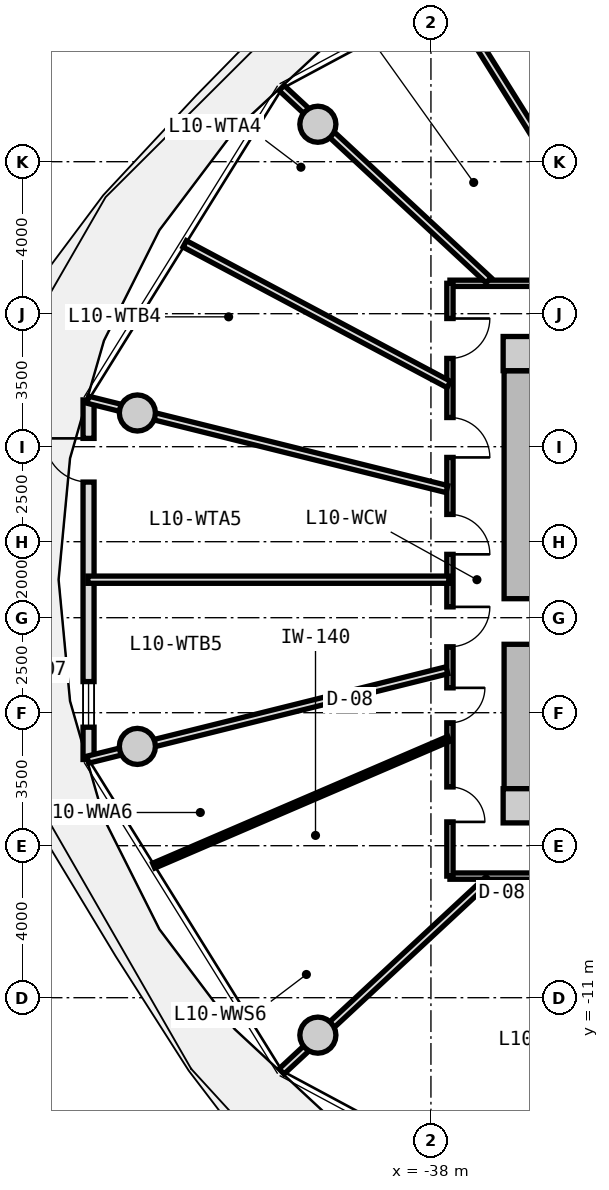
"""IFC4 building model, lengths in metres.
Left out: names, types, materials, properties, quantities, classifications, styles, units other than length and angle.
Written with IfcOpenShell. Run it as: python <this file> out.ifc"""

import sys

from ifc_helpers import new_model, si_unit, direction, frame, frame_2d, origin, origin_2d, place, context, subcontext, project, spatial, rectangle, circle, extrude, source, transform, mapped, element, fill, save


model = new_model("IFC4")
c1 = context("Model", 3, precision=1e-05, world=origin(), true_north=direction((0.0, 1.0)))
c2 = subcontext(c1, "Body", "Model", "MODEL_VIEW")
j1 = project(units=[si_unit("LENGTHUNIT", "METRE"), si_unit("PLANEANGLEUNIT", "RADIAN")], contexts=[c1])
p1 = place(None, origin())
s1 = spatial("IfcSite", under=j1, at=p1, CompositionType="ELEMENT")
p2 = place(p1, origin())
s2 = spatial("IfcBuilding", under=s1, at=p2, CompositionType="ELEMENT")
p3 = place(p2, frame((0.0, 0.0, 36.85)))
s3 = spatial("IfcBuildingStorey", under=s2, at=p3, CompositionType="ELEMENT", Elevation=36.85)
m1 = source(origin(), c2, "Body", "SweptSolid", [
    extrude(rectangle(XDim=0.9, YDim=0.9, at=origin_2d()), origin(), (0.0, 0.0, 1.0), 3.05),
])
for number, where, z_axis, x_axis in (
    (1, (-35.65, -5.95, 0.0), (0.0, 0.0, 1.0), (1.0, 0.0, 0.0)),
    (2, (-35.65, 5.95, 0.0), (0.0, 0.0, 1.0), (1.0, 0.0, 0.0)),
):
    element("IfcColumn", number, at=place(p3, frame(where, z_axis=z_axis, x_axis=x_axis)), inside=s3, PredefinedType="COLUMN", context=c2, shape_type="MappedRepresentation", body=[
        mapped(m1, transform((0.0, 0.0, 0.0), x_axis=(1.0, 0.0, 0.0), y_axis=(0.0, 1.0, 0.0), z_axis=(0.0, 0.0, 1.0), scale=1.0)),
    ])
m2 = source(origin(), c2, "Body", "SweptSolid", [
    extrude(rectangle(XDim=11.0, YDim=0.85, at=frame_2d((5.5, 0.0))), origin(), (0.0, 0.0, 1.0), 2.79),
])
p4 = place(p3, frame((-35.65, -5.5, 0.0), z_axis=(0.0, 0.0, 1.0), x_axis=(0.0, 1.0, 0.0)))
e3 = element("IfcWall", 3, at=p4, inside=s3, PredefinedType="SHEAR", context=c2, shape_type="MappedRepresentation", body=[
    mapped(m2, transform((0.0, 0.0, 0.0), x_axis=(1.0, 0.0, 0.0), y_axis=(0.0, 1.0, 0.0), z_axis=(0.0, 0.0, 1.0), scale=1.0)),
])
p5 = place(p4, frame((3.8, 0.0, 0.0)))
e4 = element("IfcOpeningElement", 4, at=p5, cuts=e3, PredefinedType="OPENING", context=c2, shape_type="SweptSolid", body=[
    extrude(rectangle(XDim=1.2, YDim=2.15, at=frame_2d((0.6, 1.075))), frame((0.0, 0.435, 0.0), z_axis=(0.0, -1.0, 0.0), x_axis=(1.0, 0.0, 0.0)), (0.0, 0.0, 1.0), 0.87),
])
m3 = source(origin(), c2, "Body", "SweptSolid", [
    extrude(circle(Radius=0.475, at=origin_2d()), origin(), (0.0, 0.0, 1.0), 3.05),
])
for number, where, z_axis, x_axis in (
    (5, (-40.975, 11.985, 0.0), (0.0, 0.0, 1.0), (1.0, 0.0, 0.0)),
    (6, (-45.725, 4.387, 0.0), (0.0, 0.0, 1.0), (1.0, 0.0, 0.0)),
    (7, (-45.725, -4.387, 0.0), (0.0, 0.0, 1.0), (1.0, 0.0, 0.0)),
    (8, (-40.975, -11.985, 0.0), (0.0, 0.0, 1.0), (1.0, 0.0, 0.0)),
):
    element("IfcColumn", number, at=place(p3, frame(where, z_axis=z_axis, x_axis=x_axis)), inside=s3, PredefinedType="COLUMN", context=c2, shape_type="MappedRepresentation", body=[
        mapped(m3, transform((0.0, 0.0, 0.0), x_axis=(1.0, 0.0, 0.0), y_axis=(0.0, 1.0, 0.0), z_axis=(0.0, 0.0, 1.0), scale=1.0)),
    ])
m4 = source(origin(), c2, "Body", "SweptSolid", [
    extrude(rectangle(XDim=9.462, YDim=0.29, at=frame_2d((4.731, 0.0))), origin(), (0.0, 0.0, 1.0), 2.79),
])
p6 = place(p3, frame((-47.01, -4.731, 0.0), z_axis=(0.0, 0.0, 1.0), x_axis=(0.0, 1.0, 0.0)))
e9 = element("IfcWall", 9, at=p6, inside=s3, PredefinedType="SOLIDWALL", context=c2, shape_type="MappedRepresentation", body=[
    mapped(m4, transform((0.0, 0.0, 0.0), x_axis=(1.0, 0.0, 0.0), y_axis=(0.0, 1.0, 0.0), z_axis=(0.0, 0.0, 1.0), scale=1.0)),
])
p7 = place(p6, frame((7.3, 0.0, 0.0)))
e10 = element("IfcOpeningElement", 10, at=p7, cuts=e9, PredefinedType="OPENING", context=c2, shape_type="SweptSolid", body=[
    extrude(rectangle(XDim=1.15, YDim=2.25, at=frame_2d((0.575, 1.125))), frame((0.0, 0.155, 0.0), z_axis=(0.0, -1.0, 0.0), x_axis=(1.0, 0.0, 0.0)), (0.0, 0.0, 1.0), 0.31),
])
p8 = place(p6, frame((0.85, 0.0, 0.85)))
e11 = element("IfcOpeningElement", 11, at=p8, cuts=e9, PredefinedType="OPENING", context=c2, shape_type="SweptSolid", body=[
    extrude(rectangle(XDim=1.2, YDim=1.5, at=frame_2d((0.6, 0.75))), frame((0.0, 0.155, 0.0), z_axis=(0.0, -1.0, 0.0), x_axis=(1.0, 0.0, 0.0)), (0.0, 0.0, 1.0), 0.31),
])
m5 = source(origin(), c2, "Body", "SweptSolid", [
    extrude(rectangle(XDim=19.0, YDim=0.165, at=frame_2d((9.5, 0.0))), origin(), (0.0, 0.0, 1.0), 2.775),
])
p9 = place(p3, frame((-37.5, 7.8, 0.0), z_axis=(0.0, 0.0, 1.0), x_axis=(1.0, 0.0, 0.0)))
e12 = element("IfcWall", 12, at=p9, inside=s3, PredefinedType="PARTITIONING", context=c2, shape_type="MappedRepresentation", body=[
    mapped(m5, transform((0.0, 0.0, 0.0), x_axis=(1.0, 0.0, 0.0), y_axis=(0.0, 1.0, 0.0), z_axis=(0.0, 0.0, 1.0), scale=1.0)),
])
p10 = place(p9, frame((9.352, 0.0, 0.0)))
e13 = element("IfcOpeningElement", 13, at=p10, cuts=e12, PredefinedType="OPENING", context=c2, shape_type="SweptSolid", body=[
    extrude(rectangle(XDim=1.05, YDim=2.15, at=frame_2d((0.525, 1.075))), frame((0.0, 0.093, 0.0), z_axis=(0.0, -1.0, 0.0), x_axis=(1.0, 0.0, 0.0)), (0.0, 0.0, 1.0), 0.185),
])
p11 = place(p9, frame((7.806, 0.0, 0.0)))
e14 = element("IfcOpeningElement", 14, at=p11, cuts=e12, PredefinedType="OPENING", context=c2, shape_type="SweptSolid", body=[
    extrude(rectangle(XDim=1.05, YDim=2.15, at=frame_2d((0.525, 1.075))), frame((0.0, 0.093, 0.0), z_axis=(0.0, -1.0, 0.0), x_axis=(1.0, 0.0, 0.0)), (0.0, 0.0, 1.0), 0.185),
])
p12 = place(p9, frame((4.773, 0.0, 0.0)))
e15 = element("IfcOpeningElement", 15, at=p12, cuts=e12, PredefinedType="OPENING", context=c2, shape_type="SweptSolid", body=[
    extrude(rectangle(XDim=1.05, YDim=2.15, at=frame_2d((0.525, 1.075))), frame((0.0, 0.093, 0.0), z_axis=(0.0, -1.0, 0.0), x_axis=(1.0, 0.0, 0.0)), (0.0, 0.0, 1.0), 0.185),
])
p13 = place(p9, frame((2.251, 0.0, 0.0)))
e16 = element("IfcOpeningElement", 16, at=p13, cuts=e12, PredefinedType="OPENING", context=c2, shape_type="SweptSolid", body=[
    extrude(rectangle(XDim=1.05, YDim=2.15, at=frame_2d((0.525, 1.075))), frame((0.0, 0.093, 0.0), z_axis=(0.0, -1.0, 0.0), x_axis=(1.0, 0.0, 0.0)), (0.0, 0.0, 1.0), 0.185),
])
p14 = place(p9, frame((14.653, 0.0, 0.0)))
e17 = element("IfcOpeningElement", 17, at=p14, cuts=e12, PredefinedType="OPENING", context=c2, shape_type="SweptSolid", body=[
    extrude(rectangle(XDim=1.05, YDim=2.15, at=frame_2d((0.525, 1.075))), frame((0.0, 0.093, 0.0), z_axis=(0.0, -1.0, 0.0), x_axis=(1.0, 0.0, 0.0)), (0.0, 0.0, 1.0), 0.185),
])
p15 = place(p9, frame((12.5, 0.0, 0.0)))
e18 = element("IfcOpeningElement", 18, at=p15, cuts=e12, PredefinedType="OPENING", context=c2, shape_type="SweptSolid", body=[
    extrude(rectangle(XDim=1.05, YDim=2.15, at=frame_2d((0.525, 1.075))), frame((0.0, 0.093, 0.0), z_axis=(0.0, -1.0, 0.0), x_axis=(1.0, 0.0, 0.0)), (0.0, 0.0, 1.0), 0.185),
])
p16 = place(p3, frame((-18.5, -7.8, 0.0), z_axis=(0.0, 0.0, 1.0), x_axis=(-1.0, 0.0, 0.0)))
e19 = element("IfcWall", 19, at=p16, inside=s3, PredefinedType="PARTITIONING", context=c2, shape_type="MappedRepresentation", body=[
    mapped(m5, transform((0.0, 0.0, 0.0), x_axis=(1.0, 0.0, 0.0), y_axis=(0.0, 1.0, 0.0), z_axis=(0.0, 0.0, 1.0), scale=1.0)),
])
p17 = place(p16, frame((14.244, 0.0, 0.0)))
e20 = element("IfcOpeningElement", 20, at=p17, cuts=e19, PredefinedType="OPENING", context=c2, shape_type="SweptSolid", body=[
    extrude(rectangle(XDim=1.25, YDim=2.2, at=frame_2d((0.625, 1.1))), frame((0.0, 0.093, 0.0), z_axis=(0.0, -1.0, 0.0), x_axis=(1.0, 0.0, 0.0)), (0.0, 0.0, 1.0), 0.185),
])
p18 = place(p16, frame((8.875, 0.0, 0.0)))
e21 = element("IfcOpeningElement", 21, at=p18, cuts=e19, PredefinedType="OPENING", context=c2, shape_type="SweptSolid", body=[
    extrude(rectangle(XDim=1.25, YDim=2.2, at=frame_2d((0.625, 1.1))), frame((0.0, 0.093, 0.0), z_axis=(0.0, -1.0, 0.0), x_axis=(1.0, 0.0, 0.0)), (0.0, 0.0, 1.0), 0.185),
])
p19 = place(p16, frame((3.506, 0.0, 0.0)))
e22 = element("IfcOpeningElement", 22, at=p19, cuts=e19, PredefinedType="OPENING", context=c2, shape_type="SweptSolid", body=[
    extrude(rectangle(XDim=1.25, YDim=2.2, at=frame_2d((0.625, 1.1))), frame((0.0, 0.093, 0.0), z_axis=(0.0, -1.0, 0.0), x_axis=(1.0, 0.0, 0.0)), (0.0, 0.0, 1.0), 0.185),
])
m6 = source(origin(), c2, "Body", "SweptSolid", [
    extrude(rectangle(XDim=15.6, YDim=0.165, at=frame_2d((7.8, 0.0))), origin(), (0.0, 0.0, 1.0), 2.775),
])
p20 = place(p3, frame((-37.5, -7.8, 0.0), z_axis=(0.0, 0.0, 1.0), x_axis=(0.0, 1.0, 0.0)))
e23 = element("IfcWall", 23, at=p20, inside=s3, PredefinedType="PARTITIONING", context=c2, shape_type="MappedRepresentation", body=[
    mapped(m6, transform((0.0, 0.0, 0.0), x_axis=(1.0, 0.0, 0.0), y_axis=(0.0, 1.0, 0.0), z_axis=(0.0, 0.0, 1.0), scale=1.0)),
])
p21 = place(p20, frame((13.623, 0.0, 0.0)))
e24 = element("IfcOpeningElement", 24, at=p21, cuts=e23, PredefinedType="OPENING", context=c2, shape_type="SweptSolid", body=[
    extrude(rectangle(XDim=1.05, YDim=2.15, at=frame_2d((0.525, 1.075))), frame((0.0, 0.093, 0.0), z_axis=(0.0, -1.0, 0.0), x_axis=(1.0, 0.0, 0.0)), (0.0, 0.0, 1.0), 0.185),
])
p22 = place(p20, frame((11.018, 0.0, 0.0)))
e25 = element("IfcOpeningElement", 25, at=p22, cuts=e23, PredefinedType="OPENING", context=c2, shape_type="SweptSolid", body=[
    extrude(rectangle(XDim=1.05, YDim=2.15, at=frame_2d((0.525, 1.075))), frame((0.0, 0.093, 0.0), z_axis=(0.0, -1.0, 0.0), x_axis=(1.0, 0.0, 0.0)), (0.0, 0.0, 1.0), 0.185),
])
p23 = place(p20, frame((8.467, 0.0, 0.0)))
e26 = element("IfcOpeningElement", 26, at=p23, cuts=e23, PredefinedType="OPENING", context=c2, shape_type="SweptSolid", body=[
    extrude(rectangle(XDim=1.05, YDim=2.15, at=frame_2d((0.525, 1.075))), frame((0.0, 0.093, 0.0), z_axis=(0.0, -1.0, 0.0), x_axis=(1.0, 0.0, 0.0)), (0.0, 0.0, 1.0), 0.185),
])
p24 = place(p20, frame((6.035, 0.0, 0.0)))
e27 = element("IfcOpeningElement", 27, at=p24, cuts=e23, PredefinedType="OPENING", context=c2, shape_type="SweptSolid", body=[
    extrude(rectangle(XDim=1.05, YDim=2.15, at=frame_2d((0.525, 1.075))), frame((0.0, 0.093, 0.0), z_axis=(0.0, -1.0, 0.0), x_axis=(1.0, 0.0, 0.0)), (0.0, 0.0, 1.0), 0.185),
])
p25 = place(p20, frame((4.034, 0.0, 0.0)))
e28 = element("IfcOpeningElement", 28, at=p25, cuts=e23, PredefinedType="OPENING", context=c2, shape_type="SweptSolid", body=[
    extrude(rectangle(XDim=0.92, YDim=2.1, at=frame_2d((0.46, 1.05))), frame((0.0, 0.093, 0.0), z_axis=(0.0, -1.0, 0.0), x_axis=(1.0, 0.0, 0.0)), (0.0, 0.0, 1.0), 0.185),
])
p26 = place(p20, frame((1.426, 0.0, 0.0)))
e29 = element("IfcOpeningElement", 29, at=p26, cuts=e23, PredefinedType="OPENING", context=c2, shape_type="SweptSolid", body=[
    extrude(rectangle(XDim=0.92, YDim=2.1, at=frame_2d((0.46, 1.05))), frame((0.0, 0.093, 0.0), z_axis=(0.0, -1.0, 0.0), x_axis=(1.0, 0.0, 0.0)), (0.0, 0.0, 1.0), 0.185),
])
m7 = source(origin(), c2, "Body", "SweptSolid", [
    extrude(rectangle(XDim=7.435, YDim=0.19, at=frame_2d((3.717, 0.0))), origin(), (0.0, 0.0, 1.0), 2.225),
])
p27 = place(p3, frame((-36.483, 7.88, 0.0), z_axis=(0.0, 0.0, 1.0), x_axis=(-0.732651956848, 0.680603489652, 0.0)))
e30 = element("IfcWall", 30, at=p27, inside=s3, PredefinedType="PARTITIONING", context=c2, shape_type="MappedRepresentation", body=[
    mapped(m7, transform((0.0, 0.0, 0.0), x_axis=(1.0, 0.0, 0.0), y_axis=(0.0, 1.0, 0.0), z_axis=(0.0, 0.0, 1.0), scale=1.0)),
])
m8 = source(origin(), c2, "Body", "SweptSolid", [
    extrude(rectangle(XDim=8.598, YDim=0.19, at=frame_2d((4.299, 0.0))), origin(), (0.0, 0.0, 1.0), 2.775),
])
p28 = place(p3, frame((-32.957, 8.017, 0.0), z_axis=(0.0, 0.0, 1.0), x_axis=(-0.530039776395, 0.847972779893, 0.0)))
e31 = element("IfcWall", 31, at=p28, inside=s3, PredefinedType="PARTITIONING", context=c2, shape_type="MappedRepresentation", body=[
    mapped(m8, transform((0.0, 0.0, 0.0), x_axis=(1.0, 0.0, 0.0), y_axis=(0.0, 1.0, 0.0), z_axis=(0.0, 0.0, 1.0), scale=1.0)),
])
m9 = source(origin(), c2, "Body", "SweptSolid", [
    extrude(rectangle(XDim=9.737, YDim=0.19, at=frame_2d((4.869, 0.0))), origin(), (0.0, 0.0, 1.0), 2.225),
])
p29 = place(p3, frame((-37.58, 2.385, 0.0), z_axis=(0.0, 0.0, 1.0), x_axis=(-0.970392716238, 0.241532557375, 0.0)))
e32 = element("IfcWall", 32, at=p29, inside=s3, PredefinedType="PARTITIONING", context=c2, shape_type="MappedRepresentation", body=[
    mapped(m9, transform((0.0, 0.0, 0.0), x_axis=(1.0, 0.0, 0.0), y_axis=(0.0, 1.0, 0.0), z_axis=(0.0, 0.0, 1.0), scale=1.0)),
])
m10 = source(origin(), c2, "Body", "SweptSolid", [
    extrude(rectangle(XDim=7.873, YDim=0.19, at=frame_2d((3.937, 0.0))), origin(), (0.0, 0.0, 1.0), 2.775),
])
p30 = place(p3, frame((-37.53, 5.138, 0.0), z_axis=(0.0, 0.0, 1.0), x_axis=(-0.882666052726, 0.470000680175, 0.0)))
e33 = element("IfcWall", 33, at=p30, inside=s3, PredefinedType="PARTITIONING", context=c2, shape_type="MappedRepresentation", body=[
    mapped(m10, transform((0.0, 0.0, 0.0), x_axis=(1.0, 0.0, 0.0), y_axis=(0.0, 1.0, 0.0), z_axis=(0.0, 0.0, 1.0), scale=1.0)),
])
p31 = place(p3, frame((-37.58, -2.385, 0.0), z_axis=(0.0, 0.0, 1.0), x_axis=(-0.970392716238, -0.241532557375, 0.0)))
e34 = element("IfcWall", 34, at=p31, inside=s3, PredefinedType="PARTITIONING", context=c2, shape_type="MappedRepresentation", body=[
    mapped(m9, transform((0.0, 0.0, 0.0), x_axis=(1.0, 0.0, 0.0), y_axis=(0.0, 1.0, 0.0), z_axis=(0.0, 0.0, 1.0), scale=1.0)),
])
m11 = source(origin(), c2, "Body", "SweptSolid", [
    extrude(rectangle(XDim=9.499, YDim=0.19, at=frame_2d((4.75, 0.0))), origin(), (0.0, 0.0, 1.0), 2.775),
])
p32 = place(p3, frame((-37.53, 0.0, 0.0), z_axis=(0.0, 0.0, 1.0), x_axis=(-1.0, 0.0, 0.0)))
e35 = element("IfcWall", 35, at=p32, inside=s3, PredefinedType="PARTITIONING", context=c2, shape_type="MappedRepresentation", body=[
    mapped(m11, transform((0.0, 0.0, 0.0), x_axis=(1.0, 0.0, 0.0), y_axis=(0.0, 1.0, 0.0), z_axis=(0.0, 0.0, 1.0), scale=1.0)),
])
p33 = place(p3, frame((-36.483, -7.88, 0.0), z_axis=(0.0, 0.0, 1.0), x_axis=(-0.732651956848, -0.680603489652, 0.0)))
e36 = element("IfcWall", 36, at=p33, inside=s3, PredefinedType="PARTITIONING", context=c2, shape_type="MappedRepresentation", body=[
    mapped(m7, transform((0.0, 0.0, 0.0), x_axis=(1.0, 0.0, 0.0), y_axis=(0.0, 1.0, 0.0), z_axis=(0.0, 0.0, 1.0), scale=1.0)),
])
m12 = source(origin(), c2, "Body", "SweptSolid", [
    extrude(rectangle(XDim=8.452, YDim=0.14, at=frame_2d((4.226, 0.0))), origin(), (0.0, 0.0, 1.0), 2.775),
])
p34 = place(p3, frame((-37.53, -4.188, 0.0), z_axis=(0.0, 0.0, 1.0), x_axis=(-0.918706709896, -0.394940478036, 0.0)))
e37 = element("IfcWall", 37, at=p34, inside=s3, PredefinedType="PARTITIONING", context=c2, shape_type="MappedRepresentation", body=[
    mapped(m12, transform((0.0, 0.0, 0.0), x_axis=(1.0, 0.0, 0.0), y_axis=(0.0, 1.0, 0.0), z_axis=(0.0, 0.0, 1.0), scale=1.0)),
])
m13 = source(origin(), c2, "Body", "SweptSolid", [
    extrude(rectangle(XDim=1.15, YDim=2.25, at=frame_2d((0.575, 1.125))), frame((0.0, 0.025, 0.0), z_axis=(0.0, -1.0, 0.0), x_axis=(1.0, 0.0, 0.0)), (0.0, 0.0, 1.0), 0.05),
])
p35 = place(p7, origin())
e38 = element("IfcDoor", 38, at=p35, inside=s3, OperationType="SINGLE_SWING_RIGHT", PredefinedType="DOOR", context=c2, shape_type="MappedRepresentation", body=[
    mapped(m13, transform((0.0, 0.0, 0.0), x_axis=(1.0, 0.0, 0.0), y_axis=(0.0, 1.0, 0.0), z_axis=(0.0, 0.0, 1.0), scale=1.0)),
])
fill(e10, e38)
m14 = source(origin(), c2, "Body", "SweptSolid", [
    extrude(rectangle(XDim=1.2, YDim=1.5, at=frame_2d((0.6, 0.75))), frame((0.0, 0.03, 0.0), z_axis=(0.0, -1.0, 0.0), x_axis=(1.0, 0.0, 0.0)), (0.0, 0.0, 1.0), 0.06),
])
p36 = place(p8, origin())
e39 = element("IfcWindow", 39, at=p36, inside=s3, PartitioningType="SINGLE_PANEL", PredefinedType="WINDOW", context=c2, shape_type="MappedRepresentation", body=[
    mapped(m14, transform((0.0, 0.0, 0.0), x_axis=(1.0, 0.0, 0.0), y_axis=(0.0, 1.0, 0.0), z_axis=(0.0, 0.0, 1.0), scale=1.0)),
])
fill(e11, e39)
m15 = source(origin(), c2, "Body", "SweptSolid", [
    extrude(rectangle(XDim=1.2, YDim=2.15, at=frame_2d((0.6, 1.075))), frame((0.0, 0.025, 0.0), z_axis=(0.0, -1.0, 0.0), x_axis=(1.0, 0.0, 0.0)), (0.0, 0.0, 1.0), 0.05),
])
p37 = place(p5, frame((1.2, 0.0, 0.0), z_axis=(0.0, 0.0, 1.0), x_axis=(-1.0, 0.0, 0.0)))
e40 = element("IfcDoor", 40, at=p37, inside=s3, OperationType="SINGLE_SWING_LEFT", PredefinedType="DOOR", context=c2, shape_type="MappedRepresentation", body=[
    mapped(m15, transform((0.0, 0.0, 0.0), x_axis=(1.0, 0.0, 0.0), y_axis=(0.0, 1.0, 0.0), z_axis=(0.0, 0.0, 1.0), scale=1.0)),
])
fill(e4, e40)
m16 = source(origin(), c2, "Body", "SweptSolid", [
    extrude(rectangle(XDim=1.05, YDim=2.15, at=frame_2d((0.525, 1.075))), frame((0.0, 0.025, 0.0), z_axis=(0.0, -1.0, 0.0), x_axis=(1.0, 0.0, 0.0)), (0.0, 0.0, 1.0), 0.05),
])
p38 = place(p21, frame((1.05, 0.0, 0.0), z_axis=(0.0, 0.0, 1.0), x_axis=(-1.0, 0.0, 0.0)))
e41 = element("IfcDoor", 41, at=p38, inside=s3, OperationType="SINGLE_SWING_LEFT", PredefinedType="DOOR", context=c2, shape_type="MappedRepresentation", body=[
    mapped(m16, transform((0.0, 0.0, 0.0), x_axis=(1.0, 0.0, 0.0), y_axis=(0.0, 1.0, 0.0), z_axis=(0.0, 0.0, 1.0), scale=1.0)),
])
fill(e24, e41)
p39 = place(p22, frame((1.05, 0.0, 0.0), z_axis=(0.0, 0.0, 1.0), x_axis=(-1.0, 0.0, 0.0)))
e42 = element("IfcDoor", 42, at=p39, inside=s3, OperationType="SINGLE_SWING_RIGHT", PredefinedType="DOOR", context=c2, shape_type="MappedRepresentation", body=[
    mapped(m16, transform((0.0, 0.0, 0.0), x_axis=(1.0, 0.0, 0.0), y_axis=(0.0, 1.0, 0.0), z_axis=(0.0, 0.0, 1.0), scale=1.0)),
])
fill(e25, e42)
p40 = place(p23, frame((1.05, 0.0, 0.0), z_axis=(0.0, 0.0, 1.0), x_axis=(-1.0, 0.0, 0.0)))
e43 = element("IfcDoor", 43, at=p40, inside=s3, OperationType="SINGLE_SWING_RIGHT", PredefinedType="DOOR", context=c2, shape_type="MappedRepresentation", body=[
    mapped(m16, transform((0.0, 0.0, 0.0), x_axis=(1.0, 0.0, 0.0), y_axis=(0.0, 1.0, 0.0), z_axis=(0.0, 0.0, 1.0), scale=1.0)),
])
fill(e26, e43)
p41 = place(p24, frame((1.05, 0.0, 0.0), z_axis=(0.0, 0.0, 1.0), x_axis=(-1.0, 0.0, 0.0)))
e44 = element("IfcDoor", 44, at=p41, inside=s3, OperationType="SINGLE_SWING_LEFT", PredefinedType="DOOR", context=c2, shape_type="MappedRepresentation", body=[
    mapped(m16, transform((0.0, 0.0, 0.0), x_axis=(1.0, 0.0, 0.0), y_axis=(0.0, 1.0, 0.0), z_axis=(0.0, 0.0, 1.0), scale=1.0)),
])
fill(e27, e44)
m17 = source(origin(), c2, "Body", "SweptSolid", [
    extrude(rectangle(XDim=0.92, YDim=2.1, at=frame_2d((0.46, 1.05))), frame((0.0, 0.025, 0.0), z_axis=(0.0, -1.0, 0.0), x_axis=(1.0, 0.0, 0.0)), (0.0, 0.0, 1.0), 0.05),
])
p42 = place(p25, frame((0.92, 0.0, 0.0), z_axis=(0.0, 0.0, 1.0), x_axis=(-1.0, 0.0, 0.0)))
e45 = element("IfcDoor", 45, at=p42, inside=s3, OperationType="SINGLE_SWING_LEFT", PredefinedType="DOOR", context=c2, shape_type="MappedRepresentation", body=[
    mapped(m17, transform((0.0, 0.0, 0.0), x_axis=(1.0, 0.0, 0.0), y_axis=(0.0, 1.0, 0.0), z_axis=(0.0, 0.0, 1.0), scale=1.0)),
])
fill(e28, e45)
p43 = place(p26, frame((0.92, 0.0, 0.0), z_axis=(0.0, 0.0, 1.0), x_axis=(-1.0, 0.0, 0.0)))
e46 = element("IfcDoor", 46, at=p43, inside=s3, OperationType="SINGLE_SWING_RIGHT", PredefinedType="DOOR", context=c2, shape_type="MappedRepresentation", body=[
    mapped(m17, transform((0.0, 0.0, 0.0), x_axis=(1.0, 0.0, 0.0), y_axis=(0.0, 1.0, 0.0), z_axis=(0.0, 0.0, 1.0), scale=1.0)),
])
fill(e29, e46)
save(model, sys.argv[1])
